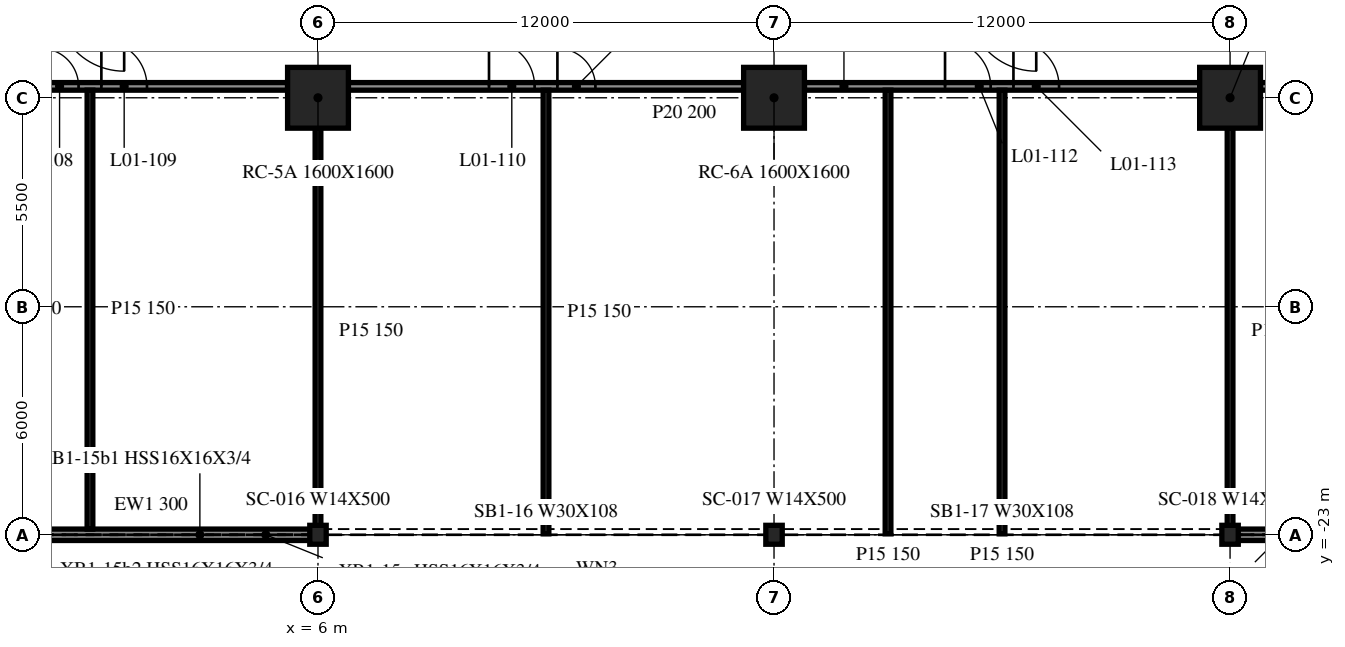
"""IFC4 building model, lengths in metres.
Left out: names, types, materials, properties, quantities, classifications, styles, units other than length and angle.
Written with IfcOpenShell. Run it as: python <this file> out.ifc"""

import sys

from ifc_helpers import new_model, si_unit, direction, frame, frame_2d, origin, origin_2d, place, context, subcontext, project, spatial, rectangle, i_section, extrude, element, fill, save


model = new_model("IFC4")
c1 = context("Model", 3, precision=1e-05, world=origin(), true_north=direction((0.0, 1.0)))
c2 = subcontext(c1, "Body", "Model", "MODEL_VIEW")
j1 = project(units=[si_unit("LENGTHUNIT", "METRE"), si_unit("PLANEANGLEUNIT", "RADIAN")], contexts=[c1])
p1 = place(None, origin())
s1 = spatial("IfcSite", under=j1, at=p1, CompositionType="ELEMENT")
p2 = place(p1, origin())
s2 = spatial("IfcBuilding", under=s1, at=p2, CompositionType="ELEMENT")
p3 = place(p2, frame((0.0, 0.0, 7.2)))
s3 = spatial("IfcBuildingStorey", under=s2, at=p3, CompositionType="ELEMENT", Elevation=7.2)
for number, where, z_axis, x_axis in (
    (1, (6.0, -11.5, -0.34), (0.0, 0.0, 1.0), (1.0, 0.0, 0.0)),
    (2, (18.0, -11.5, -0.34), (0.0, 0.0, 1.0), (1.0, 0.0, 0.0)),
    (3, (30.0, -11.5, -0.34), (0.0, 0.0, 1.0), (1.0, 0.0, 0.0)),
):
    element("IfcColumn", number, at=place(p3, frame(where, z_axis=z_axis, x_axis=x_axis)), inside=s3, PredefinedType="COLUMN", context=c2, shape_type="SweptSolid", body=[
        extrude(rectangle(XDim=1.6, YDim=1.6, at=origin_2d()), origin(), (0.0, 0.0, 1.0), 4.3),
    ])
for number, where, z_axis, x_axis in (
    (4, (6.0, -23.0, -0.34), (0.0, 0.0, 1.0), (1.0, 0.0, 0.0)),
    (5, (18.0, -23.0, -0.34), (0.0, 0.0, 1.0), (1.0, 0.0, 0.0)),
    (6, (30.0, -23.0, -0.34), (0.0, 0.0, 1.0), (1.0, 0.0, 0.0)),
):
    element("IfcColumn", number, at=place(p3, frame(where, z_axis=z_axis, x_axis=x_axis)), inside=s3, PredefinedType="COLUMN", context=c2, shape_type="SweptSolid", body=[
        extrude(i_section(OverallWidth=0.432, OverallDepth=0.498, WebThickness=0.056, FlangeThickness=0.089, at=origin_2d()), origin(), (0.0, 0.0, 1.0), 4.3),
    ])
p4 = place(p3, frame((-5.972, -23.0, 0.0), z_axis=(0.0, 0.0, 1.0), x_axis=(1.0, 0.0, 0.0)))
e7 = element("IfcWall", 7, at=p4, inside=s3, PredefinedType="NOTDEFINED", context=c2, shape_type="SweptSolid", body=[
    extrude(rectangle(XDim=11.944, YDim=0.3, at=frame_2d((5.972, 0.0))), origin(), (0.0, 0.0, 1.0), 3.203),
])
p5 = place(p4, frame((0.272, 0.0, 0.0)))
e8 = element("IfcOpeningElement", 8, at=p5, cuts=e7, PredefinedType="OPENING", context=c2, shape_type="SweptSolid", body=[
    extrude(rectangle(XDim=1.0, YDim=2.1, at=frame_2d((0.5, 1.05))), frame((0.0, 0.16, 0.0), z_axis=(0.0, -1.0, 0.0), x_axis=(1.0, 0.0, 0.0)), (0.0, 0.0, 1.0), 0.32),
])
p6 = place(p3, frame((30.028, -23.0, 0.0), z_axis=(0.0, 0.0, 1.0), x_axis=(1.0, 0.0, 0.0)))
e9 = element("IfcWall", 9, at=p6, inside=s3, PredefinedType="NOTDEFINED", context=c2, shape_type="SweptSolid", body=[
    extrude(rectangle(XDim=11.944, YDim=0.3, at=frame_2d((5.972, 0.0))), origin(), (0.0, 0.0, 1.0), 3.203),
])
p7 = place(p3, frame((-5.2, -11.2, 0.0), z_axis=(0.0, 0.0, 1.0), x_axis=(1.0, 0.0, 0.0)))
e10 = element("IfcWall", 10, at=p7, inside=s3, PredefinedType="PARTITIONING", context=c2, shape_type="SweptSolid", body=[
    extrude(rectangle(XDim=10.4, YDim=0.2, at=frame_2d((5.2, 0.0))), origin(), (0.0, 0.0, 1.0), 3.96),
])
p8 = place(p7, frame((3.9, 0.0, 0.0)))
e11 = element("IfcOpeningElement", 11, at=p8, cuts=e10, PredefinedType="OPENING", context=c2, shape_type="SweptSolid", body=[
    extrude(rectangle(XDim=1.0, YDim=2.1, at=frame_2d((0.5, 1.05))), frame((0.0, 0.11, 0.0), z_axis=(0.0, -1.0, 0.0), x_axis=(1.0, 0.0, 0.0)), (0.0, 0.0, 1.0), 0.22),
])
p9 = place(p7, frame((5.5, 0.0, 0.0)))
e12 = element("IfcOpeningElement", 12, at=p9, cuts=e10, PredefinedType="OPENING", context=c2, shape_type="SweptSolid", body=[
    extrude(rectangle(XDim=1.2, YDim=2.1, at=frame_2d((0.6, 1.05))), frame((0.0, 0.11, 0.0), z_axis=(0.0, -1.0, 0.0), x_axis=(1.0, 0.0, 0.0)), (0.0, 0.0, 1.0), 0.22),
])
p10 = place(p3, frame((6.8, -11.2, 0.0), z_axis=(0.0, 0.0, 1.0), x_axis=(1.0, 0.0, 0.0)))
e13 = element("IfcWall", 13, at=p10, inside=s3, PredefinedType="PARTITIONING", context=c2, shape_type="SweptSolid", body=[
    extrude(rectangle(XDim=10.4, YDim=0.2, at=frame_2d((5.2, 0.0))), origin(), (0.0, 0.0, 1.0), 3.96),
])
p11 = place(p10, frame((3.7, 0.0, 0.0)))
e14 = element("IfcOpeningElement", 14, at=p11, cuts=e13, PredefinedType="OPENING", context=c2, shape_type="SweptSolid", body=[
    extrude(rectangle(XDim=1.2, YDim=2.1, at=frame_2d((0.6, 1.05))), frame((0.0, 0.11, 0.0), z_axis=(0.0, -1.0, 0.0), x_axis=(1.0, 0.0, 0.0)), (0.0, 0.0, 1.0), 0.22),
])
p12 = place(p10, frame((5.5, 0.0, 0.0)))
e15 = element("IfcOpeningElement", 15, at=p12, cuts=e13, PredefinedType="OPENING", context=c2, shape_type="SweptSolid", body=[
    extrude(rectangle(XDim=1.0, YDim=2.1, at=frame_2d((0.5, 1.05))), frame((0.0, 0.11, 0.0), z_axis=(0.0, -1.0, 0.0), x_axis=(1.0, 0.0, 0.0)), (0.0, 0.0, 1.0), 0.22),
])
p13 = place(p3, frame((18.8, -11.2, 0.0), z_axis=(0.0, 0.0, 1.0), x_axis=(1.0, 0.0, 0.0)))
e16 = element("IfcWall", 16, at=p13, inside=s3, PredefinedType="PARTITIONING", context=c2, shape_type="SweptSolid", body=[
    extrude(rectangle(XDim=10.4, YDim=0.2, at=frame_2d((5.2, 0.0))), origin(), (0.0, 0.0, 1.0), 3.96),
])
p14 = place(p13, frame((3.7, 0.0, 0.0)))
e17 = element("IfcOpeningElement", 17, at=p14, cuts=e16, PredefinedType="OPENING", context=c2, shape_type="SweptSolid", body=[
    extrude(rectangle(XDim=1.2, YDim=2.1, at=frame_2d((0.6, 1.05))), frame((0.0, 0.11, 0.0), z_axis=(0.0, -1.0, 0.0), x_axis=(1.0, 0.0, 0.0)), (0.0, 0.0, 1.0), 0.22),
])
p15 = place(p13, frame((5.5, 0.0, 0.0)))
e18 = element("IfcOpeningElement", 18, at=p15, cuts=e16, PredefinedType="OPENING", context=c2, shape_type="SweptSolid", body=[
    extrude(rectangle(XDim=1.2, YDim=2.1, at=frame_2d((0.6, 1.05))), frame((0.0, 0.11, 0.0), z_axis=(0.0, -1.0, 0.0), x_axis=(1.0, 0.0, 0.0)), (0.0, 0.0, 1.0), 0.22),
])
p16 = place(p3, frame((30.8, -11.2, 0.0), z_axis=(0.0, 0.0, 1.0), x_axis=(1.0, 0.0, 0.0)))
e19 = element("IfcWall", 19, at=p16, inside=s3, PredefinedType="PARTITIONING", context=c2, shape_type="SweptSolid", body=[
    extrude(rectangle(XDim=10.4, YDim=0.2, at=frame_2d((5.2, 0.0))), origin(), (0.0, 0.0, 1.0), 3.96),
])
p17 = place(p16, frame((3.9, 0.0, 0.0)))
e20 = element("IfcOpeningElement", 20, at=p17, cuts=e19, PredefinedType="OPENING", context=c2, shape_type="SweptSolid", body=[
    extrude(rectangle(XDim=1.0, YDim=2.1, at=frame_2d((0.5, 1.05))), frame((0.0, 0.11, 0.0), z_axis=(0.0, -1.0, 0.0), x_axis=(1.0, 0.0, 0.0)), (0.0, 0.0, 1.0), 0.22),
])
p18 = place(p3, frame((0.0, -22.85, 0.0), z_axis=(0.0, 0.0, 1.0), x_axis=(0.0, 1.0, 0.0)))
e21 = element("IfcWall", 21, at=p18, inside=s3, PredefinedType="PARTITIONING", context=c2, shape_type="SweptSolid", body=[
    extrude(rectangle(XDim=11.55, YDim=0.15, at=frame_2d((5.775, 0.0))), origin(), (0.0, 0.0, 1.0), 3.96),
])
p19 = place(p3, frame((6.0, -22.975, 0.0), z_axis=(0.0, 0.0, 1.0), x_axis=(0.0, 1.0, 0.0)))
e22 = element("IfcWall", 22, at=p19, inside=s3, PredefinedType="PARTITIONING", context=c2, shape_type="SweptSolid", body=[
    extrude(rectangle(XDim=10.675, YDim=0.15, at=frame_2d((5.337, 0.0))), origin(), (0.0, 0.0, 1.0), 3.96),
])
for number, where, z_axis, x_axis in (
    (23, (12.0, -22.975, 0.0), (0.0, 0.0, 1.0), (0.0, 1.0, 0.0)),
    (24, (21.0, -22.975, 0.0), (0.0, 0.0, 1.0), (0.0, 1.0, 0.0)),
    (25, (24.0, -22.975, 0.0), (0.0, 0.0, 1.0), (0.0, 1.0, 0.0)),
):
    element("IfcWall", number, at=place(p3, frame(where, z_axis=z_axis, x_axis=x_axis)), inside=s3, PredefinedType="PARTITIONING", context=c2, shape_type="SweptSolid", body=[
        extrude(rectangle(XDim=11.675, YDim=0.15, at=frame_2d((5.837, 0.0))), origin(), (0.0, 0.0, 1.0), 3.96),
    ])
p20 = place(p3, frame((30.0, -22.975, 0.0), z_axis=(0.0, 0.0, 1.0), x_axis=(0.0, 1.0, 0.0)))
e26 = element("IfcWall", 26, at=p20, inside=s3, PredefinedType="PARTITIONING", context=c2, shape_type="SweptSolid", body=[
    extrude(rectangle(XDim=10.675, YDim=0.15, at=frame_2d((5.337, 0.0))), origin(), (0.0, 0.0, 1.0), 3.96),
])
p21 = place(p8, origin())
e27 = element("IfcDoor", 27, at=p21, inside=s3, OperationType="SINGLE_SWING_RIGHT", PredefinedType="DOOR", context=c2, shape_type="SweptSolid", body=[
    extrude(rectangle(XDim=1.0, YDim=2.1, at=frame_2d((0.5, 1.05))), frame((0.0, 0.025, 0.0), z_axis=(0.0, -1.0, 0.0), x_axis=(1.0, 0.0, 0.0)), (0.0, 0.0, 1.0), 0.05),
])
fill(e11, e27)
p22 = place(p9, origin())
e28 = element("IfcDoor", 28, at=p22, inside=s3, OperationType="SINGLE_SWING_LEFT", PredefinedType="DOOR", context=c2, shape_type="SweptSolid", body=[
    extrude(rectangle(XDim=1.2, YDim=2.1, at=frame_2d((0.6, 1.05))), frame((0.0, 0.025, 0.0), z_axis=(0.0, -1.0, 0.0), x_axis=(1.0, 0.0, 0.0)), (0.0, 0.0, 1.0), 0.05),
])
fill(e12, e28)
p23 = place(p11, origin())
e29 = element("IfcDoor", 29, at=p23, inside=s3, OperationType="SINGLE_SWING_RIGHT", PredefinedType="DOOR", context=c2, shape_type="SweptSolid", body=[
    extrude(rectangle(XDim=1.2, YDim=2.1, at=frame_2d((0.6, 1.05))), frame((0.0, 0.025, 0.0), z_axis=(0.0, -1.0, 0.0), x_axis=(1.0, 0.0, 0.0)), (0.0, 0.0, 1.0), 0.05),
])
fill(e14, e29)
p24 = place(p12, origin())
e30 = element("IfcDoor", 30, at=p24, inside=s3, OperationType="SINGLE_SWING_LEFT", PredefinedType="DOOR", context=c2, shape_type="SweptSolid", body=[
    extrude(rectangle(XDim=1.0, YDim=2.1, at=frame_2d((0.5, 1.05))), frame((0.0, 0.025, 0.0), z_axis=(0.0, -1.0, 0.0), x_axis=(1.0, 0.0, 0.0)), (0.0, 0.0, 1.0), 0.05),
])
fill(e15, e30)
p25 = place(p14, origin())
e31 = element("IfcDoor", 31, at=p25, inside=s3, OperationType="SINGLE_SWING_RIGHT", PredefinedType="DOOR", context=c2, shape_type="SweptSolid", body=[
    extrude(rectangle(XDim=1.2, YDim=2.1, at=frame_2d((0.6, 1.05))), frame((0.0, 0.025, 0.0), z_axis=(0.0, -1.0, 0.0), x_axis=(1.0, 0.0, 0.0)), (0.0, 0.0, 1.0), 0.05),
])
fill(e17, e31)
p26 = place(p15, origin())
e32 = element("IfcDoor", 32, at=p26, inside=s3, OperationType="SINGLE_SWING_LEFT", PredefinedType="DOOR", context=c2, shape_type="SweptSolid", body=[
    extrude(rectangle(XDim=1.2, YDim=2.1, at=frame_2d((0.6, 1.05))), frame((0.0, 0.025, 0.0), z_axis=(0.0, -1.0, 0.0), x_axis=(1.0, 0.0, 0.0)), (0.0, 0.0, 1.0), 0.05),
])
fill(e18, e32)
save(model, sys.argv[1])
